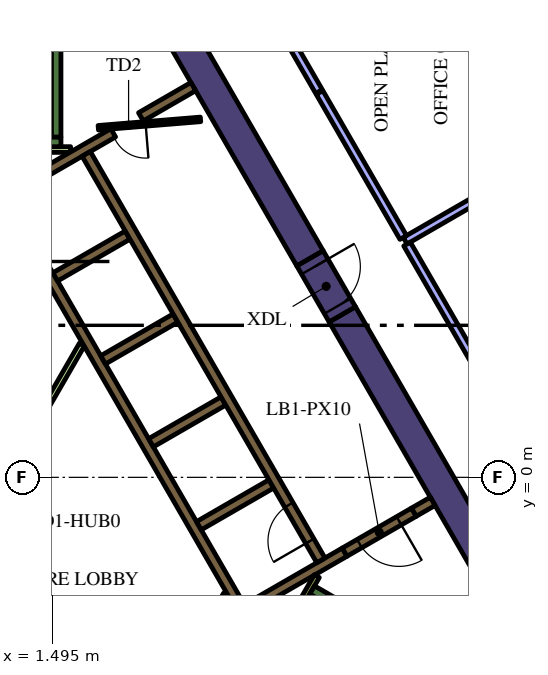
"""IFC4 building model, lengths in metres.
Left out: names, types, materials, properties, quantities, classifications, styles, units other than length and angle.
Written with IfcOpenShell. Run it as: python <this file> out.ifc"""

import sys

from ifc_helpers import new_model, si_unit, direction, frame, frame_2d, origin, place, context, subcontext, project, spatial, rectangle, extrude, element, fill, save


model = new_model("IFC4")
c1 = context("Model", 3, precision=1e-05, world=origin(), true_north=direction((0.0, 1.0)))
c2 = subcontext(c1, "Body", "Model", "MODEL_VIEW")
j1 = project(units=[si_unit("LENGTHUNIT", "METRE"), si_unit("PLANEANGLEUNIT", "RADIAN")], contexts=[c1])
p1 = place(None, origin())
s1 = spatial("IfcSite", under=j1, at=p1, CompositionType="ELEMENT")
p2 = place(p1, origin())
s2 = spatial("IfcBuilding", under=s1, at=p2, CompositionType="ELEMENT")
p3 = place(p2, frame((0.0, 0.0, 162.6)))
s3 = spatial("IfcBuildingStorey", under=s2, at=p3, CompositionType="ELEMENT", Elevation=162.6)
p4 = place(p3, frame((9.129, 4.289, 0.0), z_axis=(0.0, 0.0, 1.0), x_axis=(0.499995742806, -0.866027861663, 0.0)))
e1 = element("IfcWall", 1, at=p4, inside=s3, PredefinedType="SOLIDWALL", context=c2, shape_type="SweptSolid", body=[
    extrude(rectangle(XDim=12.527, YDim=0.8, at=frame_2d((6.264, 0.0))), origin(), (0.0, 0.0, 1.0), 4.2),
])
p5 = place(p3, frame((8.279, 5.761, 0.0), z_axis=(0.0, 0.0, 1.0), x_axis=(-0.500010359015, 0.866019422922, 0.0)))
e2 = element("IfcWall", 2, at=p5, inside=s3, PredefinedType="SOLIDWALL", context=c2, shape_type="SweptSolid", body=[
    extrude(rectangle(XDim=12.528, YDim=0.8, at=frame_2d((6.264, 0.0))), origin(), (0.0, 0.0, 1.0), 4.2),
])
p6 = place(p3, frame((8.334, -2.964, 0.0), z_axis=(0.0, 0.0, 1.0), x_axis=(0.866016039709, -0.500016218704, 0.0)))
e3 = element("IfcWall", 3, at=p6, inside=s3, PredefinedType="SOLIDWALL", context=c2, shape_type="SweptSolid", body=[
    extrude(rectangle(XDim=7.05, YDim=0.25, at=frame_2d((3.525, 0.0))), origin(), (0.0, 0.0, 1.0), 4.2),
])
p7 = place(p3, frame((8.168, -3.503, 0.0), z_axis=(0.0, 0.0, 1.0), x_axis=(0.49972245349, 0.866185586049, 0.0)))
e4 = element("IfcWall", 4, at=p7, inside=s3, PredefinedType="SOLIDWALL", context=c2, shape_type="SweptSolid", body=[
    extrude(rectangle(XDim=0.425, YDim=0.25, at=frame_2d((0.212, 0.0))), origin(), (0.0, 0.0, 1.0), 4.2),
])
p8 = place(p3, frame((1.6, 8.95, 0.0), z_axis=(0.0, 0.0, 1.0), x_axis=(0.0, 1.0, 0.0)))
e5 = element("IfcWall", 5, at=p8, inside=s3, PredefinedType="SOLIDWALL", context=c2, shape_type="SweptSolid", body=[
    extrude(rectangle(XDim=6.8, YDim=0.25, at=frame_2d((3.4, 0.0))), origin(), (0.0, 0.0, 1.0), 4.2),
])
p9 = place(p3, frame((1.05, 8.825, 0.0), z_axis=(0.0, 0.0, 1.0), x_axis=(1.0, 0.0, 0.0)))
e6 = element("IfcWall", 6, at=p9, inside=s3, PredefinedType="SOLIDWALL", context=c2, shape_type="SweptSolid", body=[
    extrude(rectangle(XDim=0.675, YDim=0.25, at=frame_2d((0.337, 0.0))), origin(), (0.0, 0.0, 1.0), 4.2),
])
p10 = place(p3, frame((11.507, -0.631, 0.0), z_axis=(0.0, 0.0, 1.0), x_axis=(-0.866093731455, -0.499881634324, 0.0)))
e7 = element("IfcWall", 7, at=p10, inside=s3, PredefinedType="SOLIDWALL", context=c2, shape_type="SweptSolid", body=[
    extrude(rectangle(XDim=0.575, YDim=0.25, at=frame_2d((0.288, 0.0))), origin(), (0.0, 0.0, 1.0), 4.2),
])
p11 = place(p3, frame((6.568, -3.627, 0.0), z_axis=(0.0, 0.0, 1.0), x_axis=(-0.499999455981, 0.866025717874, 0.0)))
e8 = element("IfcWall", 8, at=p11, inside=s3, PredefinedType="SOLIDWALL", context=c2, shape_type="SweptSolid", body=[
    extrude(rectangle(XDim=11.978, YDim=0.25, at=frame_2d((5.989, 0.0))), origin(), (0.0, 0.0, 1.0), 4.2),
])
p12 = place(p3, frame((3.1, 9.064, 0.0), z_axis=(0.0, 0.0, 1.0), x_axis=(-0.866030133475, -0.499991807846, 0.0)))
e9 = element("IfcWall", 9, at=p12, inside=s3, PredefinedType="SOLIDWALL", context=c2, shape_type="SweptSolid", body=[
    extrude(rectangle(XDim=3.217, YDim=0.25, at=frame_2d((1.608, 0.0))), origin(), (0.0, 0.0, 1.0), 4.2),
])
p13 = place(p3, frame((1.574, 5.274, 0.0), z_axis=(0.0, 0.0, 1.0), x_axis=(0.866028486751, 0.499994660107, 0.0)))
e10 = element("IfcWall", 10, at=p13, inside=s3, PredefinedType="SOLIDWALL", context=c2, shape_type="SweptSolid", body=[
    extrude(rectangle(XDim=2.2, YDim=0.25, at=frame_2d((1.1, 0.0))), origin(), (0.0, 0.0, 1.0), 4.2),
])
for number, where, z_axis, x_axis in (
    (11, (2.834, 3.091, 0.0), (0.0, 0.0, 1.0), (0.866, 0.5, 0.0)),
    (12, (4.094, 0.909, 0.0), (0.0, 0.0, 1.0), (0.866, 0.5, 0.0)),
    (13, (5.354, -1.274, 0.0), (0.0, 0.0, 1.0), (0.866, 0.5, 0.0)),
):
    element("IfcWall", number, at=place(p3, frame(where, z_axis=z_axis, x_axis=x_axis)), inside=s3, PredefinedType="SOLIDWALL", context=c2, shape_type="SweptSolid", body=[
        extrude(rectangle(XDim=2.2, YDim=0.25, at=frame_2d((1.1, 0.0))), origin(), (0.0, 0.0, 1.0), 4.2),
    ])
p14 = place(p3, frame((6.614, -3.456, 0.0), z_axis=(0.0, 0.0, 1.0), x_axis=(0.866032512851, 0.499987686533, 0.0)))
e14 = element("IfcWall", 14, at=p14, inside=s3, PredefinedType="SOLIDWALL", context=c2, shape_type="SweptSolid", body=[
    extrude(rectangle(XDim=2.975, YDim=0.25, at=frame_2d((1.487, 0.0))), origin(), (0.0, 0.0, 1.0), 4.2),
])
p15 = place(p3, frame((3.83, 9.486, 0.0), z_axis=(0.0, 0.0, 1.0), x_axis=(0.865986202621, 0.500067892261, 0.0)))
e15 = element("IfcWall", 15, at=p15, inside=s3, PredefinedType="SOLIDWALL", context=c2, shape_type="SweptSolid", body=[
    extrude(rectangle(XDim=1.591, YDim=0.25, at=frame_2d((0.795, 0.0))), origin(), (0.0, 0.0, 1.0), 4.2),
])
p16 = place(p3, frame((1.05, 8.625, 0.0), z_axis=(0.0, 0.0, 1.0), x_axis=(1.0, 0.0, 0.0)))
e16 = element("IfcWall", 16, at=p16, inside=s3, PredefinedType="PARTITIONING", context=c2, shape_type="SweptSolid", body=[
    extrude(rectangle(XDim=0.929, YDim=0.15, at=frame_2d((0.464, 0.0))), origin(), (0.0, 0.0, 1.0), 3.15),
])
p17 = place(p3, frame((8.459, -2.599, 0.0), z_axis=(0.0, 0.0, 1.0), x_axis=(-0.500041054325, -0.866001699761, 0.0)))
e17 = element("IfcWall", 17, at=p17, inside=s3, PredefinedType="PARTITIONING", context=c2, shape_type="SweptSolid", body=[
    extrude(rectangle(XDim=0.929, YDim=0.15, at=frame_2d((0.464, 0.0))), origin(), (0.0, 0.0, 1.0), 4.2),
])
p18 = place(p3, frame((5.705, -3.718, 0.0), z_axis=(0.0, 0.0, 1.0), x_axis=(0.499962090823, 0.866047289552, 0.0)))
e18 = element("IfcWall", 18, at=p18, inside=s3, PredefinedType="PARTITIONING", context=c2, shape_type="SweptSolid", body=[
    extrude(rectangle(XDim=0.735, YDim=0.15, at=frame_2d((0.367, 0.0))), origin(), (0.0, 0.0, 1.0), 3.15),
])
p19 = place(p3, frame((0.72, 0.797, 0.0), z_axis=(0.0, 0.0, 1.0), x_axis=(0.499984921984, 0.866034108906, 0.0)))
e19 = element("IfcWall", 19, at=p19, inside=s3, PredefinedType="PARTITIONING", context=c2, shape_type="SweptSolid", body=[
    extrude(rectangle(XDim=3.113, YDim=0.15, at=frame_2d((1.557, 0.0))), origin(), (0.0, 0.0, 1.0), 3.15),
])
p20 = place(p3, frame((8.565, -2.185, 0.0), z_axis=(0.0, 0.0, 1.0), x_axis=(-0.499997954832, 0.866026584559, 0.0)))
e20 = element("IfcWall", 20, at=p20, inside=s3, PredefinedType="SOLIDWALL", context=c2, shape_type="SweptSolid", body=[
    extrude(rectangle(XDim=12.35, YDim=0.25, at=frame_2d((6.175, 0.0))), origin(), (0.0, 0.0, 1.0), 4.2),
])
p21 = place(p20, frame((0.585, 0.0, 0.0)))
e21 = element("IfcOpeningElement", 21, at=p21, cuts=e20, PredefinedType="OPENING", context=c2, shape_type="SweptSolid", body=[
    extrude(rectangle(XDim=1.1, YDim=2.1, at=frame_2d((0.55, 1.05))), frame((0.0, 0.135, 0.0), z_axis=(0.0, -1.0, 0.0), x_axis=(1.0, 0.0, 0.0)), (0.0, 0.0, 1.0), 0.27),
])
p22 = place(p3, frame((5.398, 9.419, 0.0), z_axis=(0.0, 0.0, 1.0), x_axis=(-0.996653416376, -0.081743303248, 0.0)))
e22 = element("IfcWall", 22, at=p22, inside=s3, PredefinedType="PARTITIONING", context=c2, shape_type="SweptSolid", body=[
    extrude(rectangle(XDim=2.7, YDim=0.12, at=frame_2d((1.35, 0.0))), origin(), (0.0, 0.0, 1.0), 3.15),
])
p23 = place(p22, frame((1.45, 0.0, 0.0)))
e23 = element("IfcOpeningElement", 23, at=p23, cuts=e22, PredefinedType="OPENING", context=c2, shape_type="SweptSolid", body=[
    extrude(rectangle(XDim=0.9, YDim=2.1, at=frame_2d((0.45, 1.05))), frame((0.0, 0.07, 0.0), z_axis=(0.0, -1.0, 0.0), x_axis=(1.0, 0.0, 0.0)), (0.0, 0.0, 1.0), 0.14),
])
p24 = place(p3, frame((11.009, -0.919, 0.0), z_axis=(0.0, 0.0, 1.0), x_axis=(-0.866059744384, -0.49994051562, 0.0)))
e24 = element("IfcWall", 24, at=p24, inside=s3, PredefinedType="SOLIDWALL", context=c2, shape_type="SweptSolid", body=[
    extrude(rectangle(XDim=2.1, YDim=0.25, at=frame_2d((1.05, 0.0))), origin(), (0.0, 0.0, 1.0), 4.2),
])
p25 = place(p24, frame((0.45, 0.0, 0.0)))
e25 = element("IfcOpeningElement", 25, at=p25, cuts=e24, PredefinedType="OPENING", context=c2, shape_type="SweptSolid", body=[
    extrude(rectangle(XDim=1.2, YDim=2.1, at=frame_2d((0.6, 1.05))), frame((0.0, 0.135, 0.0), z_axis=(0.0, -1.0, 0.0), x_axis=(1.0, 0.0, 0.0)), (0.0, 0.0, 1.0), 0.27),
])
p26 = place(p3, frame((8.279, 5.761, 0.0), z_axis=(0.0, 0.0, 1.0), x_axis=(0.500062241894, -0.865989465428, 0.0)))
e26 = element("IfcWall", 26, at=p26, inside=s3, PredefinedType="SOLIDWALL", context=c2, shape_type="SweptSolid", body=[
    extrude(rectangle(XDim=1.7, YDim=0.8, at=frame_2d((0.85, 0.0))), origin(), (0.0, 0.0, 1.0), 4.2),
])
p27 = place(p26, frame((0.25, 0.0, 0.0)))
e27 = element("IfcOpeningElement", 27, at=p27, cuts=e26, PredefinedType="OPENING", context=c2, shape_type="SweptSolid", body=[
    extrude(rectangle(XDim=1.2, YDim=2.1, at=frame_2d((0.6, 1.05))), frame((0.0, 0.41, 0.0), z_axis=(0.0, -1.0, 0.0), x_axis=(1.0, 0.0, 0.0)), (0.0, 0.0, 1.0), 0.82),
])
p28 = place(p3, frame((10.782, 6.225, 0.0), z_axis=(0.0, 0.0, 1.0), x_axis=(0.866034752867, 0.499983806564, 0.0)))
e28 = element("IfcWall", 28, at=p28, inside=s3, PredefinedType="PARTITIONING", context=c2, shape_type="SweptSolid", body=[
    extrude(rectangle(XDim=4.043, YDim=0.2, at=frame_2d((2.021, 0.0))), origin(), (0.0, 0.0, 1.0), 3.15),
])
p29 = place(p3, frame((13.032, 2.328, 0.0), z_axis=(0.0, 0.0, 1.0), x_axis=(-0.499988222896, 0.866032203192, 0.0)))
e29 = element("IfcWall", 29, at=p29, inside=s3, PredefinedType="PARTITIONING", context=c2, shape_type="SweptSolid", body=[
    extrude(rectangle(XDim=4.4, YDim=0.2, at=frame_2d((2.2, 0.0))), origin(), (0.0, 0.0, 1.0), 3.15),
])
p30 = place(p3, frame((9.403, 16.447, 0.0), z_axis=(0.0, 0.0, 1.0), x_axis=(0.527026092571, -0.849849102929, 0.0)))
e30 = element("IfcWall", 30, at=p30, inside=s3, PredefinedType="PARTITIONING", context=c2, shape_type="SweptSolid", body=[
    extrude(rectangle(XDim=6.407, YDim=0.15, at=frame_2d((3.204, 0.0))), origin(), (0.0, 0.0, 1.0), 3.15),
])
p31 = place(p30, frame((2.707, 0.0, 0.0)))
e31 = element("IfcOpeningElement", 31, at=p31, cuts=e30, PredefinedType="OPENING", context=c2, shape_type="SweptSolid", body=[
    extrude(rectangle(XDim=0.9, YDim=2.1, at=frame_2d((0.45, 1.05))), frame((0.0, 0.085, 0.0), z_axis=(0.0, -1.0, 0.0), x_axis=(1.0, 0.0, 0.0)), (0.0, 0.0, 1.0), 0.17),
])
p32 = place(p3, frame((10.732, 6.312, 0.0), z_axis=(0.0, 0.0, 1.0), x_axis=(-0.499984786451, 0.866034187153, 0.0)))
e32 = element("IfcWall", 32, at=p32, inside=s3, PredefinedType="PARTITIONING", context=c2, shape_type="SweptSolid", body=[
    extrude(rectangle(XDim=4.404, YDim=0.2, at=frame_2d((2.202, 0.0))), origin(), (0.0, 0.0, 1.0), 3.15),
])
p33 = place(p3, frame((8.515, 10.152, 0.0), z_axis=(0.0, 0.0, 1.0), x_axis=(-0.499998974385, 0.866025995923, 0.0)))
e33 = element("IfcWall", 33, at=p33, inside=s3, PredefinedType="PARTITIONING", context=c2, shape_type="SweptSolid", body=[
    extrude(rectangle(XDim=9.986, YDim=0.2, at=frame_2d((4.993, 0.0))), origin(), (0.0, 0.0, 1.0), 3.15),
])
p34 = place(p33, frame((4.5, 0.0, 0.0)))
e34 = element("IfcOpeningElement", 34, at=p34, cuts=e33, PredefinedType="OPENING", context=c2, shape_type="SweptSolid", body=[
    extrude(rectangle(XDim=1.0, YDim=2.1, at=frame_2d((0.5, 1.05))), frame((0.0, 0.11, 0.0), z_axis=(0.0, -1.0, 0.0), x_axis=(1.0, 0.0, 0.0)), (0.0, 0.0, 1.0), 0.22),
])
p35 = place(p21, origin())
e35 = element("IfcDoor", 35, at=p35, inside=s3, OperationType="DOUBLE_DOOR_SLIDING", PredefinedType="DOOR", context=c2, shape_type="SweptSolid", body=[
    extrude(rectangle(XDim=1.1, YDim=2.1, at=frame_2d((0.55, 1.05))), frame((0.0, 0.025, 0.0), z_axis=(0.0, -1.0, 0.0), x_axis=(1.0, 0.0, 0.0)), (0.0, 0.0, 1.0), 0.05),
])
fill(e21, e35)
p36 = place(p23, origin())
e36 = element("IfcDoor", 36, at=p36, inside=s3, OperationType="SINGLE_SWING_LEFT", PredefinedType="DOOR", context=c2, shape_type="SweptSolid", body=[
    extrude(rectangle(XDim=0.9, YDim=2.1, at=frame_2d((0.45, 1.05))), frame((0.0, 0.025, 0.0), z_axis=(0.0, -1.0, 0.0), x_axis=(1.0, 0.0, 0.0)), (0.0, 0.0, 1.0), 0.05),
])
fill(e23, e36)
p37 = place(p25, origin())
e37 = element("IfcDoor", 37, at=p37, inside=s3, OperationType="SINGLE_SWING_LEFT", PredefinedType="DOOR", context=c2, shape_type="SweptSolid", body=[
    extrude(rectangle(XDim=1.2, YDim=2.1, at=frame_2d((0.6, 1.05))), frame((0.0, 0.025, 0.0), z_axis=(0.0, -1.0, 0.0), x_axis=(1.0, 0.0, 0.0)), (0.0, 0.0, 1.0), 0.05),
])
fill(e25, e37)
p38 = place(p27, origin())
e38 = element("IfcDoor", 38, at=p38, inside=s3, OperationType="SINGLE_SWING_LEFT", PredefinedType="DOOR", context=c2, shape_type="SweptSolid", body=[
    extrude(rectangle(XDim=1.2, YDim=2.1, at=frame_2d((0.6, 1.05))), frame((0.0, 0.025, 0.0), z_axis=(0.0, -1.0, 0.0), x_axis=(1.0, 0.0, 0.0)), (0.0, 0.0, 1.0), 0.05),
])
fill(e27, e38)
save(model, sys.argv[1])
